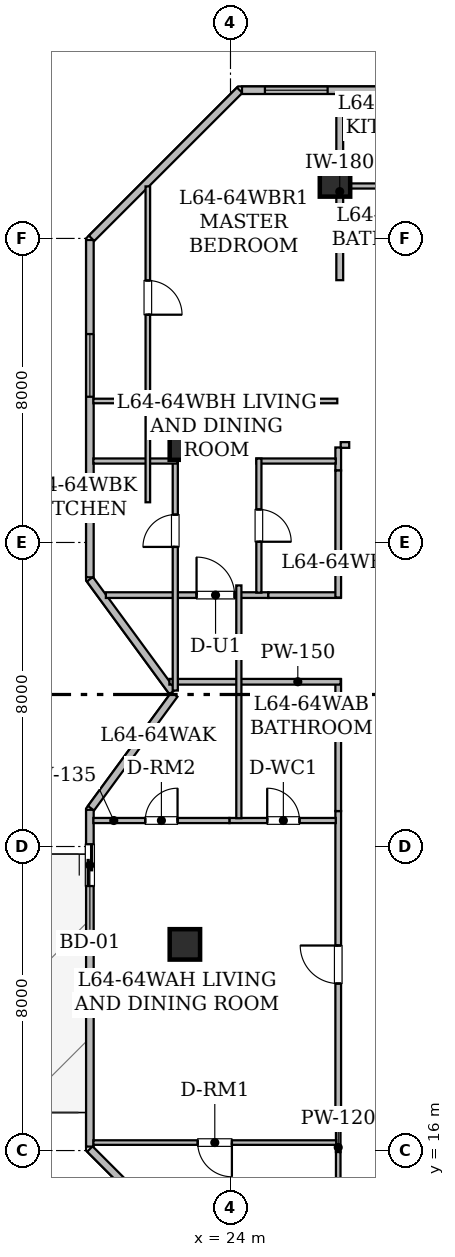
"""IFC4 building model, lengths in metres.
Left out: names, types, materials, properties, quantities, classifications, styles, units other than length and angle.
Written with IfcOpenShell. Run it as: python <this file> out.ifc"""

import sys

from ifc_helpers import new_model, si_unit, direction, frame, frame_2d, origin, origin_2d, place, context, subcontext, project, spatial, rectangle, hollow_rectangle, extrude, element, fill, save


model = new_model("IFC4")
c1 = context("Model", 3, precision=1e-05, world=origin(), true_north=direction((0.0, 1.0)))
c2 = subcontext(c1, "Body", "Model", "MODEL_VIEW")
j1 = project(units=[si_unit("LENGTHUNIT", "METRE"), si_unit("PLANEANGLEUNIT", "RADIAN")], contexts=[c1])
p1 = place(None, origin())
s1 = spatial("IfcSite", under=j1, at=p1, CompositionType="ELEMENT")
p2 = place(p1, origin())
s2 = spatial("IfcBuilding", under=s1, at=p2, CompositionType="ELEMENT")
p3 = place(p2, frame((0.0, 0.0, 250.05)))
s3 = spatial("IfcBuildingStorey", under=s2, at=p3, CompositionType="ELEMENT", Elevation=250.05)
for number, where, z_axis, x_axis in (
    (1, (26.75, 41.5, 0.0), (0.0, 0.0, 1.0), (1.0, 0.0, 0.0)),
    (2, (22.8, 21.425, 0.0), (0.0, 0.0, 1.0), (1.0, 0.0, 0.0)),
    (3, (22.8, 34.575, 0.0), (0.0, 0.0, 1.0), (1.0, 0.0, 0.0)),
):
    element("IfcColumn", number, at=place(p3, frame(where, z_axis=z_axis, x_axis=x_axis)), inside=s3, PredefinedType="COLUMN", context=c2, shape_type="SweptSolid", body=[
        extrude(hollow_rectangle(XDim=0.8, YDim=0.8, WallThickness=0.04, at=origin_2d()), origin(), (0.0, 0.0, 1.0), 3.65),
    ])
p4 = place(p3, frame((24.241, 12.1, 0.0), z_axis=(0.0, 0.0, 1.0), x_axis=(-0.707106781187, 0.707106781187, 0.0)))
e4 = element("IfcWall", 4, at=p4, inside=s3, PredefinedType="STANDARD", context=c2, shape_type="SweptSolid", body=[
    extrude(rectangle(XDim=5.573, YDim=0.2, at=frame_2d((2.787, 0.0))), origin(), (0.0, 0.0, 1.0), 3.43),
])
p5 = place(p3, frame((20.3, 16.104, 0.0), z_axis=(0.0, 0.0, 1.0), x_axis=(0.0, 1.0, 0.0)))
e5 = element("IfcWall", 5, at=p5, inside=s3, PredefinedType="STANDARD", context=c2, shape_type="SweptSolid", body=[
    extrude(rectangle(XDim=8.863, YDim=0.2, at=frame_2d((4.432, 0.0))), origin(), (0.0, 0.0, 1.0), 3.43),
])
p6 = place(p5, frame((6.856, 0.0, 0.0)))
e6 = element("IfcOpeningElement", 6, at=p6, cuts=e5, PredefinedType="OPENING", context=c2, shape_type="SweptSolid", body=[
    extrude(rectangle(XDim=1.1, YDim=2.2, at=frame_2d((0.55, 1.1))), frame((0.0, 0.11, 0.0), z_axis=(0.0, -1.0, 0.0), x_axis=(1.0, 0.0, 0.0)), (0.0, 0.0, 1.0), 0.22),
])
p7 = place(p3, frame((20.329, 25.007, 0.0), z_axis=(0.0, 0.0, 1.0), x_axis=(0.591366515379, 0.806402904564, 0.0)))
e7 = element("IfcWall", 7, at=p7, inside=s3, PredefinedType="STANDARD", context=c2, shape_type="SweptSolid", body=[
    extrude(rectangle(XDim=3.711, YDim=0.2, at=frame_2d((1.856, 0.0))), origin(), (0.0, 0.0, 1.0), 3.43),
])
p8 = place(p3, frame((22.473, 28.069, 0.0), z_axis=(0.0, 0.0, 1.0), x_axis=(-0.591248456881, 0.80648946815, 0.0)))
e8 = element("IfcWall", 8, at=p8, inside=s3, PredefinedType="STANDARD", context=c2, shape_type="SweptSolid", body=[
    extrude(rectangle(XDim=3.675, YDim=0.2, at=frame_2d((1.837, 0.0))), origin(), (0.0, 0.0, 1.0), 3.43),
])
p9 = place(p3, frame((20.3, 31.084, 0.0), z_axis=(0.0, 0.0, 1.0), x_axis=(0.0, 1.0, 0.0)))
e9 = element("IfcWall", 9, at=p9, inside=s3, PredefinedType="STANDARD", context=c2, shape_type="SweptSolid", body=[
    extrude(rectangle(XDim=8.875, YDim=0.2, at=frame_2d((4.438, 0.0))), origin(), (0.0, 0.0, 1.0), 3.43),
])
p10 = place(p9, frame((4.75, 0.0, 0.85)))
e10 = element("IfcOpeningElement", 10, at=p10, cuts=e9, PredefinedType="OPENING", context=c2, shape_type="SweptSolid", body=[
    extrude(rectangle(XDim=1.65, YDim=1.55, at=frame_2d((0.825, 0.775))), frame((0.0, 0.11, 0.0), z_axis=(0.0, -1.0, 0.0), x_axis=(1.0, 0.0, 0.0)), (0.0, 0.0, 1.0), 0.22),
])
p11 = place(p3, frame((20.344, 40.003, 0.0), z_axis=(0.0, 0.0, 1.0), x_axis=(0.707106781187, 0.707106781187, 0.0)))
e11 = element("IfcWall", 11, at=p11, inside=s3, PredefinedType="STANDARD", context=c2, shape_type="SweptSolid", body=[
    extrude(rectangle(XDim=5.511, YDim=0.2, at=frame_2d((2.756, 0.0))), origin(), (0.0, 0.0, 1.0), 3.43),
])
p12 = place(p3, frame((24.302, 43.9, 0.0), z_axis=(0.0, 0.0, 1.0), x_axis=(1.0, 0.0, 0.0)))
e12 = element("IfcWall", 12, at=p12, inside=s3, PredefinedType="STANDARD", context=c2, shape_type="SweptSolid", body=[
    extrude(rectangle(XDim=41.457, YDim=0.2, at=frame_2d((20.729, 0.0))), origin(), (0.0, 0.0, 1.0), 3.43),
])
p13 = place(p12, frame((0.604, 0.0, 0.85)))
e13 = element("IfcOpeningElement", 13, at=p13, cuts=e12, PredefinedType="OPENING", context=c2, shape_type="SweptSolid", body=[
    extrude(rectangle(XDim=1.65, YDim=1.55, at=frame_2d((0.825, 0.775))), frame((0.0, 0.11, 0.0), z_axis=(0.0, -1.0, 0.0), x_axis=(1.0, 0.0, 0.0)), (0.0, 0.0, 1.0), 0.22),
])
p14 = place(p12, frame((9.098, 0.0, 0.85)))
e14 = element("IfcOpeningElement", 14, at=p14, cuts=e12, PredefinedType="OPENING", context=c2, shape_type="SweptSolid", body=[
    extrude(rectangle(XDim=1.65, YDim=1.55, at=frame_2d((0.825, 0.775))), frame((0.0, 0.11, 0.0), z_axis=(0.0, -1.0, 0.0), x_axis=(1.0, 0.0, 0.0)), (0.0, 0.0, 1.0), 0.22),
])
p15 = place(p12, frame((14.405, 0.0, 0.85)))
e15 = element("IfcOpeningElement", 15, at=p15, cuts=e12, PredefinedType="OPENING", context=c2, shape_type="SweptSolid", body=[
    extrude(rectangle(XDim=1.65, YDim=1.55, at=frame_2d((0.825, 0.775))), frame((0.0, 0.11, 0.0), z_axis=(0.0, -1.0, 0.0), x_axis=(1.0, 0.0, 0.0)), (0.0, 0.0, 1.0), 0.22),
])
p16 = place(p12, frame((22.898, 0.0, 0.8)))
e16 = element("IfcOpeningElement", 16, at=p16, cuts=e12, PredefinedType="OPENING", context=c2, shape_type="SweptSolid", body=[
    extrude(rectangle(XDim=1.2, YDim=1.5, at=frame_2d((0.6, 0.75))), frame((0.0, 0.11, 0.0), z_axis=(0.0, -1.0, 0.0), x_axis=(1.0, 0.0, 0.0)), (0.0, 0.0, 1.0), 0.22),
])
p17 = place(p12, frame((19.188, 0.0, 0.85)))
e17 = element("IfcOpeningElement", 17, at=p17, cuts=e12, PredefinedType="OPENING", context=c2, shape_type="SweptSolid", body=[
    extrude(rectangle(XDim=1.65, YDim=1.55, at=frame_2d((0.825, 0.775))), frame((0.0, 0.11, 0.0), z_axis=(0.0, -1.0, 0.0), x_axis=(1.0, 0.0, 0.0)), (0.0, 0.0, 1.0), 0.22),
])
p18 = place(p12, frame((26.158, 0.0, 0.85)))
e18 = element("IfcOpeningElement", 18, at=p18, cuts=e12, PredefinedType="OPENING", context=c2, shape_type="SweptSolid", body=[
    extrude(rectangle(XDim=1.65, YDim=1.55, at=frame_2d((0.825, 0.775))), frame((0.0, 0.11, 0.0), z_axis=(0.0, -1.0, 0.0), x_axis=(1.0, 0.0, 0.0)), (0.0, 0.0, 1.0), 0.22),
])
p19 = place(p12, frame((32.408, 0.0, 0.85)))
e19 = element("IfcOpeningElement", 19, at=p19, cuts=e12, PredefinedType="OPENING", context=c2, shape_type="SweptSolid", body=[
    extrude(rectangle(XDim=1.65, YDim=1.55, at=frame_2d((0.825, 0.775))), frame((0.0, 0.11, 0.0), z_axis=(0.0, -1.0, 0.0), x_axis=(1.0, 0.0, 0.0)), (0.0, 0.0, 1.0), 0.22),
])
p20 = place(p3, frame((35.514, 16.835, 0.0), z_axis=(0.0, 0.0, 1.0), x_axis=(-1.0, 0.0, 0.0)))
e20 = element("IfcWall", 20, at=p20, inside=s3, PredefinedType="STANDARD", context=c2, shape_type="SweptSolid", body=[
    extrude(rectangle(XDim=8.614, YDim=0.15, at=frame_2d((4.307, 0.0))), origin(), (0.0, 0.0, 1.0), 2.725),
])
p21 = place(p20, frame((3.753, 0.0, 0.0)))
e21 = element("IfcOpeningElement", 21, at=p21, cuts=e20, PredefinedType="OPENING", context=c2, shape_type="SweptSolid", body=[
    extrude(rectangle(XDim=1.15, YDim=2.2, at=frame_2d((0.575, 1.1))), frame((0.0, 0.085, 0.0), z_axis=(0.0, -1.0, 0.0), x_axis=(1.0, 0.0, 0.0)), (0.0, 0.0, 1.0), 0.17),
])
p22 = place(p3, frame((26.835, 16.9, 0.0), z_axis=(0.0, 0.0, 1.0), x_axis=(0.0, 1.0, 0.0)))
e22 = element("IfcWall", 22, at=p22, inside=s3, PredefinedType="STANDARD", context=c2, shape_type="SweptSolid", body=[
    extrude(rectangle(XDim=8.033, YDim=0.15, at=frame_2d((4.017, 0.0))), origin(), (0.0, 0.0, 1.0), 2.725),
])
p23 = place(p22, frame((3.495, 0.0, 0.0)))
e23 = element("IfcOpeningElement", 23, at=p23, cuts=e22, PredefinedType="OPENING", context=c2, shape_type="SweptSolid", body=[
    extrude(rectangle(XDim=1.0, YDim=2.15, at=frame_2d((0.5, 1.075))), frame((0.0, 0.085, 0.0), z_axis=(0.0, -1.0, 0.0), x_axis=(1.0, 0.0, 0.0)), (0.0, 0.0, 1.0), 0.17),
])
p24 = place(p3, frame((26.835, 24.933, 0.0), z_axis=(0.0, 0.0, 1.0), x_axis=(0.0, 1.0, 0.0)))
e24 = element("IfcWall", 24, at=p24, inside=s3, PredefinedType="STANDARD", context=c2, shape_type="SweptSolid", body=[
    extrude(rectangle(XDim=3.467, YDim=0.15, at=frame_2d((1.733, 0.0))), origin(), (0.0, 0.0, 1.0), 3.43),
])
p25 = place(p3, frame((26.898, 28.335, 0.0), z_axis=(0.0, 0.0, 1.0), x_axis=(-1.0, 0.0, 0.0)))
e25 = element("IfcWall", 25, at=p25, inside=s3, PredefinedType="STANDARD", context=c2, shape_type="SweptSolid", body=[
    extrude(rectangle(XDim=4.506, YDim=0.15, at=frame_2d((2.253, 0.0))), origin(), (0.0, 0.0, 1.0), 2.887),
])
p26 = place(p3, frame((20.721, 30.615, 0.0), z_axis=(0.0, 0.0, 1.0), x_axis=(1.0, 0.0, 0.0)))
e26 = element("IfcWall", 26, at=p26, inside=s3, PredefinedType="STANDARD", context=c2, shape_type="SweptSolid", body=[
    extrude(rectangle(XDim=4.275, YDim=0.15, at=frame_2d((2.138, 0.0))), origin(), (0.0, 0.0, 1.0), 2.887),
])
p27 = place(p26, frame((2.386, 0.0, 0.0)))
e27 = element("IfcOpeningElement", 27, at=p27, cuts=e26, PredefinedType="OPENING", context=c2, shape_type="SweptSolid", body=[
    extrude(rectangle(XDim=1.0, YDim=2.15, at=frame_2d((0.5, 1.075))), frame((0.0, 0.085, 0.0), z_axis=(0.0, -1.0, 0.0), x_axis=(1.0, 0.0, 0.0)), (0.0, 0.0, 1.0), 0.17),
])
p28 = place(p3, frame((26.835, 33.894, 0.0), z_axis=(0.0, 0.0, 1.0), x_axis=(0.0, 1.0, 0.0)))
e28 = element("IfcWall", 28, at=p28, inside=s3, PredefinedType="STANDARD", context=c2, shape_type="SweptSolid", body=[
    extrude(rectangle(XDim=0.606, YDim=0.15, at=frame_2d((0.303, 0.0))), origin(), (0.0, 0.0, 1.0), 3.43),
])
p29 = place(p3, frame((26.9, 34.565, 0.0), z_axis=(0.0, 0.0, 1.0), x_axis=(1.0, 0.0, 0.0)))
e29 = element("IfcWall", 29, at=p29, inside=s3, PredefinedType="STANDARD", context=c2, shape_type="SweptSolid", body=[
    extrude(rectangle(XDim=0.224, YDim=0.15, at=frame_2d((0.112, 0.0))), origin(), (0.0, 0.0, 1.0), 3.43),
])
p30 = place(p3, frame((24.996, 30.615, 0.0), z_axis=(0.0, 0.0, 1.0), x_axis=(1.0, 0.0, 0.0)))
e30 = element("IfcWall", 30, at=p30, inside=s3, PredefinedType="STANDARD", context=c2, shape_type="SweptSolid", body=[
    extrude(rectangle(XDim=1.904, YDim=0.15, at=frame_2d((0.952, 0.0))), origin(), (0.0, 0.0, 1.0), 3.43),
])
p31 = place(p3, frame((26.835, 30.552, 0.0), z_axis=(0.0, 0.0, 1.0), x_axis=(0.0, 1.0, 0.0)))
e31 = element("IfcWall", 31, at=p31, inside=s3, PredefinedType="STANDARD", context=c2, shape_type="SweptSolid", body=[
    extrude(rectangle(XDim=3.342, YDim=0.15, at=frame_2d((1.671, 0.0))), origin(), (0.0, 0.0, 1.0), 2.961),
])
p32 = place(p3, frame((26.835, 15.961, 0.0), z_axis=(0.0, 0.0, 1.0), x_axis=(0.0, 1.0, 0.0)))
e32 = element("IfcWall", 32, at=p32, inside=s3, PredefinedType="PARTITIONING", context=c2, shape_type="SweptSolid", body=[
    extrude(rectangle(XDim=0.809, YDim=0.12, at=frame_2d((0.405, 0.0))), origin(), (0.0, 0.0, 1.0), 3.43),
])
p33 = place(p3, frame((26.835, 12.192, 0.0), z_axis=(0.0, 0.0, 1.0), x_axis=(0.0, 1.0, 0.0)))
e33 = element("IfcWall", 33, at=p33, inside=s3, PredefinedType="PARTITIONING", context=c2, shape_type="SweptSolid", body=[
    extrude(rectangle(XDim=3.769, YDim=0.12, at=frame_2d((1.885, 0.0))), origin(), (0.0, 0.0, 1.0), 2.725),
])
p34 = place(p3, frame((23.971, 24.684, 0.0), z_axis=(0.0, 0.0, 1.0), x_axis=(1.0, 0.0, 0.0)))
e34 = element("IfcWall", 34, at=p34, inside=s3, PredefinedType="PARTITIONING", context=c2, shape_type="SweptSolid", body=[
    extrude(rectangle(XDim=2.799, YDim=0.135, at=frame_2d((1.399, 0.0))), origin(), (0.0, 0.0, 1.0), 3.43),
])
p35 = place(p34, frame((0.995, 0.0, 0.0)))
e35 = element("IfcOpeningElement", 35, at=p35, cuts=e34, PredefinedType="OPENING", context=c2, shape_type="SweptSolid", body=[
    extrude(rectangle(XDim=0.85, YDim=2.1, at=frame_2d((0.425, 1.05))), frame((0.0, 0.077, 0.0), z_axis=(0.0, -1.0, 0.0), x_axis=(1.0, 0.0, 0.0)), (0.0, 0.0, 1.0), 0.155),
])
p36 = place(p3, frame((20.392, 24.684, 0.0), z_axis=(0.0, 0.0, 1.0), x_axis=(1.0, 0.0, 0.0)))
e36 = element("IfcWall", 36, at=p36, inside=s3, PredefinedType="PARTITIONING", context=c2, shape_type="SweptSolid", body=[
    extrude(rectangle(XDim=3.579, YDim=0.135, at=frame_2d((1.79, 0.0))), origin(), (0.0, 0.0, 1.0), 2.887),
])
p37 = place(p36, frame((1.365, 0.0, 0.0)))
e37 = element("IfcOpeningElement", 37, at=p37, cuts=e36, PredefinedType="OPENING", context=c2, shape_type="SweptSolid", body=[
    extrude(rectangle(XDim=0.85, YDim=2.1, at=frame_2d((0.425, 1.05))), frame((0.0, 0.077, 0.0), z_axis=(0.0, -1.0, 0.0), x_axis=(1.0, 0.0, 0.0)), (0.0, 0.0, 1.0), 0.155),
])
p38 = place(p3, frame((26.781, 16.21, 0.0), z_axis=(0.0, 0.0, 1.0), x_axis=(-1.0, 0.0, 0.0)))
e38 = element("IfcWall", 38, at=p38, inside=s3, PredefinedType="PARTITIONING", context=c2, shape_type="SweptSolid", body=[
    extrude(rectangle(XDim=6.389, YDim=0.12, at=frame_2d((3.194, 0.0))), origin(), (0.0, 0.0, 1.0), 2.887),
])
p39 = place(p38, frame((2.744, 0.0, 0.0)))
e39 = element("IfcOpeningElement", 39, at=p39, cuts=e38, PredefinedType="OPENING", context=c2, shape_type="SweptSolid", body=[
    extrude(rectangle(XDim=0.9, YDim=2.1, at=frame_2d((0.45, 1.05))), frame((0.0, 0.07, 0.0), z_axis=(0.0, -1.0, 0.0), x_axis=(1.0, 0.0, 0.0)), (0.0, 0.0, 1.0), 0.14),
])
p40 = place(p3, frame((24.22, 24.745, 0.0), z_axis=(0.0, 0.0, 1.0), x_axis=(0.0, 1.0, 0.0)))
e40 = element("IfcWall", 40, at=p40, inside=s3, PredefinedType="PARTITIONING", context=c2, shape_type="SweptSolid", body=[
    extrude(rectangle(XDim=6.125, YDim=0.135, at=frame_2d((3.062, 0.0))), origin(), (0.0, 0.0, 1.0), 3.43),
])
p41 = place(p3, frame((26.77, 34.143, 0.0), z_axis=(0.0, 0.0, 1.0), x_axis=(-1.0, 0.0, 0.0)))
e41 = element("IfcWall", 41, at=p41, inside=s3, PredefinedType="PARTITIONING", context=c2, shape_type="SweptSolid", body=[
    extrude(rectangle(XDim=2.088, YDim=0.135, at=frame_2d((1.044, 0.0))), origin(), (0.0, 0.0, 1.0), 3.43),
])
p42 = place(p3, frame((24.747, 34.208, 0.0), z_axis=(0.0, 0.0, 1.0), x_axis=(0.0, -1.0, 0.0)))
e42 = element("IfcWall", 42, at=p42, inside=s3, PredefinedType="PARTITIONING", context=c2, shape_type="SweptSolid", body=[
    extrude(rectangle(XDim=3.528, YDim=0.135, at=frame_2d((1.764, 0.0))), origin(), (0.0, 0.0, 1.0), 2.961),
])
p43 = place(p42, frame((1.339, 0.0, 0.0)))
e43 = element("IfcOpeningElement", 43, at=p43, cuts=e42, PredefinedType="OPENING", context=c2, shape_type="SweptSolid", body=[
    extrude(rectangle(XDim=0.85, YDim=2.1, at=frame_2d((0.425, 1.05))), frame((0.0, 0.077, 0.0), z_axis=(0.0, -1.0, 0.0), x_axis=(1.0, 0.0, 0.0)), (0.0, 0.0, 1.0), 0.155),
])
p44 = place(p3, frame((22.547, 28.104, 0.0), z_axis=(0.0, 0.0, 1.0), x_axis=(0.0, 1.0, 0.0)))
e44 = element("IfcWall", 44, at=p44, inside=s3, PredefinedType="PARTITIONING", context=c2, shape_type="SweptSolid", body=[
    extrude(rectangle(XDim=6.104, YDim=0.135, at=frame_2d((3.052, 0.0))), origin(), (0.0, 0.0, 1.0), 2.887),
])
p45 = place(p44, frame((3.779, 0.0, 0.0)))
e45 = element("IfcOpeningElement", 45, at=p45, cuts=e44, PredefinedType="OPENING", context=c2, shape_type="SweptSolid", body=[
    extrude(rectangle(XDim=0.85, YDim=2.1, at=frame_2d((0.425, 1.05))), frame((0.0, 0.077, 0.0), z_axis=(0.0, -1.0, 0.0), x_axis=(1.0, 0.0, 0.0)), (0.0, 0.0, 1.0), 0.155),
])
p46 = place(p3, frame((22.612, 34.143, 0.0), z_axis=(0.0, 0.0, 1.0), x_axis=(-1.0, 0.0, 0.0)))
e46 = element("IfcWall", 46, at=p46, inside=s3, PredefinedType="PARTITIONING", context=c2, shape_type="SweptSolid", body=[
    extrude(rectangle(XDim=2.22, YDim=0.135, at=frame_2d((1.11, 0.0))), origin(), (0.0, 0.0, 1.0), 3.43),
])
p47 = place(p3, frame((21.825, 41.369, 0.0), z_axis=(0.0, 0.0, 1.0), x_axis=(0.0, -1.0, 0.0)))
e47 = element("IfcWall", 47, at=p47, inside=s3, PredefinedType="PARTITIONING", context=c2, shape_type="SweptSolid", body=[
    extrude(rectangle(XDim=8.311, YDim=0.12, at=frame_2d((4.155, 0.0))), origin(), (0.0, 0.0, 1.0), 3.43),
])
p48 = place(p47, frame((2.476, 0.0, 0.0)))
e48 = element("IfcOpeningElement", 48, at=p48, cuts=e47, PredefinedType="OPENING", context=c2, shape_type="SweptSolid", body=[
    extrude(rectangle(XDim=0.9, YDim=2.1, at=frame_2d((0.45, 1.05))), frame((0.0, 0.07, 0.0), z_axis=(0.0, -1.0, 0.0), x_axis=(1.0, 0.0, 0.0)), (0.0, 0.0, 1.0), 0.14),
])
p49 = place(p3, frame((20.392, 35.723, 0.0), z_axis=(0.0, 0.0, 1.0), x_axis=(1.0, 0.0, 0.0)))
e49 = element("IfcWall", 49, at=p49, inside=s3, PredefinedType="PARTITIONING", context=c2, shape_type="SweptSolid", body=[
    extrude(rectangle(XDim=6.418, YDim=0.12, at=frame_2d((3.209, 0.0))), origin(), (0.0, 0.0, 1.0), 2.725),
])
p50 = place(p3, frame((26.875, 41.643, 0.0), z_axis=(0.0, 0.0, 1.0), x_axis=(0.0, -1.0, 0.0)))
e50 = element("IfcWall", 50, at=p50, inside=s3, PredefinedType="STANDARD", context=c2, shape_type="SweptSolid", body=[
    extrude(rectangle(XDim=2.741, YDim=0.18, at=frame_2d((1.371, 0.0))), origin(), (0.0, 0.0, 1.0), 2.725),
])
p51 = place(p3, frame((26.875, 43.808, 0.0), z_axis=(0.0, 0.0, 1.0), x_axis=(0.0, -1.0, 0.0)))
e51 = element("IfcWall", 51, at=p51, inside=s3, PredefinedType="STANDARD", context=c2, shape_type="SweptSolid", body=[
    extrude(rectangle(XDim=2.165, YDim=0.18, at=frame_2d((1.083, 0.0))), origin(), (0.0, 0.0, 1.0), 2.725),
])
p52 = place(p3, frame((26.957, 41.38, 0.0), z_axis=(0.0, 0.0, 1.0), x_axis=(1.0, 0.0, 0.0)))
e52 = element("IfcWall", 52, at=p52, inside=s3, PredefinedType="PARTITIONING", context=c2, shape_type="SweptSolid", body=[
    extrude(rectangle(XDim=3.982, YDim=0.135, at=frame_2d((1.991, 0.0))), origin(), (0.0, 0.0, 1.0), 2.725),
])
p53 = place(p6, origin())
e53 = element("IfcDoor", 53, at=p53, inside=s3, OperationType="SLIDING_TO_LEFT", PredefinedType="DOOR", context=c2, shape_type="SweptSolid", body=[
    extrude(rectangle(XDim=1.1, YDim=2.2, at=frame_2d((0.55, 1.1))), frame((0.0, 0.025, 0.0), z_axis=(0.0, -1.0, 0.0), x_axis=(1.0, 0.0, 0.0)), (0.0, 0.0, 1.0), 0.05),
])
fill(e6, e53)
p54 = place(p10, origin())
e54 = element("IfcWindow", 54, at=p54, inside=s3, PartitioningType="SINGLE_PANEL", PredefinedType="WINDOW", context=c2, shape_type="SweptSolid", body=[
    extrude(rectangle(XDim=1.65, YDim=1.55, at=frame_2d((0.825, 0.775))), frame((0.0, 0.03, 0.0), z_axis=(0.0, -1.0, 0.0), x_axis=(1.0, 0.0, 0.0)), (0.0, 0.0, 1.0), 0.06),
])
fill(e10, e54)
p55 = place(p13, origin())
e55 = element("IfcWindow", 55, at=p55, inside=s3, PartitioningType="SINGLE_PANEL", PredefinedType="WINDOW", context=c2, shape_type="SweptSolid", body=[
    extrude(rectangle(XDim=1.65, YDim=1.55, at=frame_2d((0.825, 0.775))), frame((0.0, 0.03, 0.0), z_axis=(0.0, -1.0, 0.0), x_axis=(1.0, 0.0, 0.0)), (0.0, 0.0, 1.0), 0.06),
])
fill(e13, e55)
p56 = place(p23, origin())
e56 = element("IfcDoor", 56, at=p56, inside=s3, OperationType="SINGLE_SWING_RIGHT", PredefinedType="DOOR", context=c2, shape_type="SweptSolid", body=[
    extrude(rectangle(XDim=1.0, YDim=2.15, at=frame_2d((0.5, 1.075))), frame((0.0, 0.025, 0.0), z_axis=(0.0, -1.0, 0.0), x_axis=(1.0, 0.0, 0.0)), (0.0, 0.0, 1.0), 0.05),
])
fill(e23, e56)
p57 = place(p27, origin())
e57 = element("IfcDoor", 57, at=p57, inside=s3, OperationType="SINGLE_SWING_LEFT", PredefinedType="DOOR", context=c2, shape_type="SweptSolid", body=[
    extrude(rectangle(XDim=1.0, YDim=2.15, at=frame_2d((0.5, 1.075))), frame((0.0, 0.025, 0.0), z_axis=(0.0, -1.0, 0.0), x_axis=(1.0, 0.0, 0.0)), (0.0, 0.0, 1.0), 0.05),
])
fill(e27, e57)
p58 = place(p35, origin())
e58 = element("IfcDoor", 58, at=p58, inside=s3, OperationType="SINGLE_SWING_LEFT", PredefinedType="DOOR", context=c2, shape_type="SweptSolid", body=[
    extrude(rectangle(XDim=0.85, YDim=2.1, at=frame_2d((0.425, 1.05))), frame((0.0, 0.025, 0.0), z_axis=(0.0, -1.0, 0.0), x_axis=(1.0, 0.0, 0.0)), (0.0, 0.0, 1.0), 0.05),
])
fill(e35, e58)
p59 = place(p37, origin())
e59 = element("IfcDoor", 59, at=p59, inside=s3, OperationType="SINGLE_SWING_RIGHT", PredefinedType="DOOR", context=c2, shape_type="SweptSolid", body=[
    extrude(rectangle(XDim=0.85, YDim=2.1, at=frame_2d((0.425, 1.05))), frame((0.0, 0.025, 0.0), z_axis=(0.0, -1.0, 0.0), x_axis=(1.0, 0.0, 0.0)), (0.0, 0.0, 1.0), 0.05),
])
fill(e37, e59)
p60 = place(p39, origin())
e60 = element("IfcDoor", 60, at=p60, inside=s3, OperationType="SINGLE_SWING_LEFT", PredefinedType="DOOR", context=c2, shape_type="SweptSolid", body=[
    extrude(rectangle(XDim=0.9, YDim=2.1, at=frame_2d((0.45, 1.05))), frame((0.0, 0.025, 0.0), z_axis=(0.0, -1.0, 0.0), x_axis=(1.0, 0.0, 0.0)), (0.0, 0.0, 1.0), 0.05),
])
fill(e39, e60)
p61 = place(p43, origin())
e61 = element("IfcDoor", 61, at=p61, inside=s3, OperationType="SINGLE_SWING_RIGHT", PredefinedType="DOOR", context=c2, shape_type="SweptSolid", body=[
    extrude(rectangle(XDim=0.85, YDim=2.1, at=frame_2d((0.425, 1.05))), frame((0.0, 0.025, 0.0), z_axis=(0.0, -1.0, 0.0), x_axis=(1.0, 0.0, 0.0)), (0.0, 0.0, 1.0), 0.05),
])
fill(e43, e61)
p62 = place(p45, origin())
e62 = element("IfcDoor", 62, at=p62, inside=s3, OperationType="SINGLE_SWING_LEFT", PredefinedType="DOOR", context=c2, shape_type="SweptSolid", body=[
    extrude(rectangle(XDim=0.85, YDim=2.1, at=frame_2d((0.425, 1.05))), frame((0.0, 0.025, 0.0), z_axis=(0.0, -1.0, 0.0), x_axis=(1.0, 0.0, 0.0)), (0.0, 0.0, 1.0), 0.05),
])
fill(e45, e62)
p63 = place(p48, origin())
e63 = element("IfcDoor", 63, at=p63, inside=s3, OperationType="SINGLE_SWING_RIGHT", PredefinedType="DOOR", context=c2, shape_type="SweptSolid", body=[
    extrude(rectangle(XDim=0.9, YDim=2.1, at=frame_2d((0.45, 1.05))), frame((0.0, 0.025, 0.0), z_axis=(0.0, -1.0, 0.0), x_axis=(1.0, 0.0, 0.0)), (0.0, 0.0, 1.0), 0.05),
])
fill(e48, e63)
save(model, sys.argv[1])
